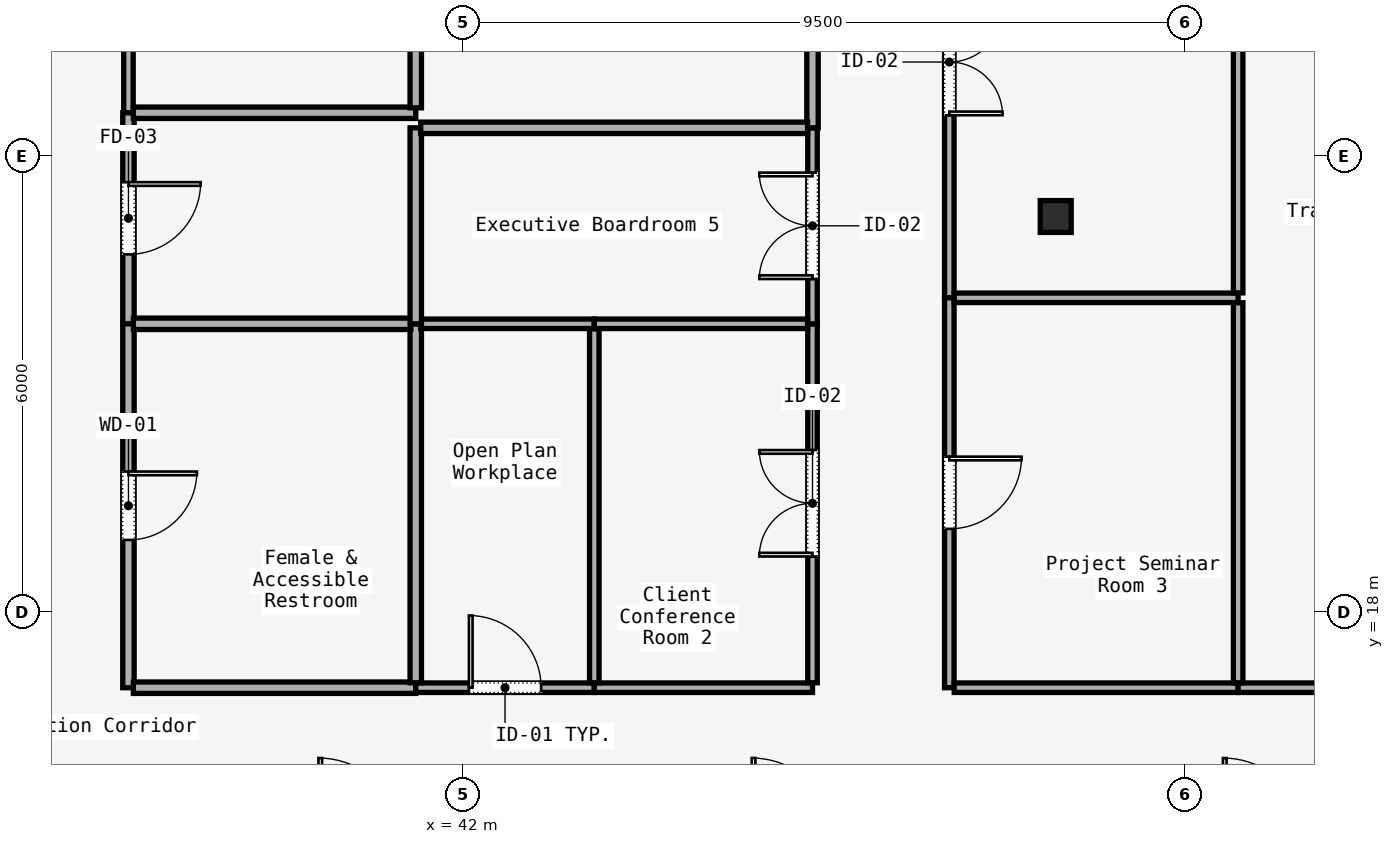
"""IFC4 building model, lengths in metres.
Left out: names, types, materials, properties, quantities, classifications, styles, units other than length and angle.
Written with IfcOpenShell. Run it as: python <this file> out.ifc"""

import sys

from ifc_helpers import new_model, si_unit, direction, frame, frame_2d, origin, origin_2d, place, context, subcontext, project, spatial, rectangle, i_section, extrude, element, fill, save


model = new_model("IFC4")
c1 = context("Model", 3, precision=1e-05, world=origin(), true_north=direction((0.0, 1.0)))
c2 = subcontext(c1, "Body", "Model", "MODEL_VIEW")
j1 = project(units=[si_unit("LENGTHUNIT", "METRE"), si_unit("PLANEANGLEUNIT", "RADIAN")], contexts=[c1])
p1 = place(None, origin())
s1 = spatial("IfcSite", under=j1, at=p1, CompositionType="ELEMENT")
p2 = place(p1, origin())
s2 = spatial("IfcBuilding", under=s1, at=p2, CompositionType="ELEMENT")
p3 = place(p2, frame((0.0, 0.0, 134.6)))
s3 = spatial("IfcBuildingStorey", under=s2, at=p3, CompositionType="ELEMENT", Elevation=134.6)
p4 = place(p3, frame((49.8, 23.2, 0.0), z_axis=(0.0, 0.0, 1.0), x_axis=(1.0, 0.0, 0.0)))
e1 = element("IfcColumn", 1, at=p4, inside=s3, PredefinedType="COLUMN", context=c2, shape_type="SweptSolid", body=[
    extrude(i_section(OverallWidth=0.407, OverallDepth=0.419, WebThickness=0.031, FlangeThickness=0.049, FilletRadius=0.015, at=origin_2d()), origin(), (0.0, 0.0, 1.0), 3.58),
])
p5 = place(p3, frame((37.6, 28.335, 0.0), z_axis=(0.0, 0.0, 1.0), x_axis=(0.0, -1.0, 0.0)))
e2 = element("IfcWall", 2, at=p5, inside=s3, PredefinedType="PARTITIONING", context=c2, shape_type="SweptSolid", body=[
    extrude(rectangle(XDim=3.77, YDim=0.125, at=frame_2d((1.885, 0.0))), origin(), (0.0, 0.0, 1.0), 3.01),
])
p6 = place(p5, frame((1.41, 0.0, 0.0)))
e3 = element("IfcOpeningElement", 3, at=p6, cuts=e2, PredefinedType="OPENING", context=c2, shape_type="SweptSolid", body=[
    extrude(rectangle(XDim=0.95, YDim=2.2, at=frame_2d((0.475, 1.1))), frame((0.0, 0.062, 0.0), z_axis=(0.0, -1.0, 0.0), x_axis=(1.0, 0.0, 0.0)), (0.0, 0.0, 1.0), 0.125),
])
p7 = place(p3, frame((37.6, 24.565, 0.0), z_axis=(0.0, 0.0, 1.0), x_axis=(0.0, -1.0, 0.0)))
e4 = element("IfcWall", 4, at=p7, inside=s3, PredefinedType="PARTITIONING", context=c2, shape_type="SweptSolid", body=[
    extrude(rectangle(XDim=2.777, YDim=0.15, at=frame_2d((1.388, 0.0))), origin(), (0.0, 0.0, 1.0), 3.01),
])
p8 = place(p7, frame((0.914, 0.0, 0.0)))
e5 = element("IfcOpeningElement", 5, at=p8, cuts=e4, PredefinedType="OPENING", context=c2, shape_type="SweptSolid", body=[
    extrude(rectangle(XDim=0.95, YDim=2.2, at=frame_2d((0.475, 1.1))), frame((0.0, 0.075, 0.0), z_axis=(0.0, -1.0, 0.0), x_axis=(1.0, 0.0, 0.0)), (0.0, 0.0, 1.0), 0.15),
])
p9 = place(p3, frame((37.6, 21.788, 0.0), z_axis=(0.0, 0.0, 1.0), x_axis=(0.0, -1.0, 0.0)))
e6 = element("IfcWall", 6, at=p9, inside=s3, PredefinedType="PARTITIONING", context=c2, shape_type="SweptSolid", body=[
    extrude(rectangle(XDim=4.788, YDim=0.15, at=frame_2d((2.394, 0.0))), origin(), (0.0, 0.0, 1.0), 3.01),
])
p10 = place(p9, frame((1.944, 0.0, 0.0)))
e7 = element("IfcOpeningElement", 7, at=p10, cuts=e6, PredefinedType="OPENING", context=c2, shape_type="SweptSolid", body=[
    extrude(rectangle(XDim=0.9, YDim=2.15, at=frame_2d((0.45, 1.075))), frame((0.0, 0.075, 0.0), z_axis=(0.0, -1.0, 0.0), x_axis=(1.0, 0.0, 0.0)), (0.0, 0.0, 1.0), 0.15),
])
p11 = place(p3, frame((37.665, 17.0, 0.0), z_axis=(0.0, 0.0, 1.0), x_axis=(1.0, 0.0, 0.0)))
e8 = element("IfcWall", 8, at=p11, inside=s3, PredefinedType="PARTITIONING", context=c2, shape_type="SweptSolid", body=[
    extrude(rectangle(XDim=3.715, YDim=0.15, at=frame_2d((1.857, 0.0))), origin(), (0.0, 0.0, 1.0), 3.01),
])
p12 = place(p3, frame((41.38, 17.0, 0.0), z_axis=(0.0, 0.0, 1.0), x_axis=(1.0, 0.0, 0.0)))
e9 = element("IfcWall", 9, at=p12, inside=s3, PredefinedType="PARTITIONING", context=c2, shape_type="SweptSolid", body=[
    extrude(rectangle(XDim=2.349, YDim=0.125, at=frame_2d((1.175, 0.0))), origin(), (0.0, 0.0, 1.0), 3.01),
])
p13 = place(p12, frame((0.699, 0.0, 0.0)))
e10 = element("IfcOpeningElement", 10, at=p13, cuts=e9, PredefinedType="OPENING", context=c2, shape_type="SweptSolid", body=[
    extrude(rectangle(XDim=0.95, YDim=2.2, at=frame_2d((0.475, 1.1))), frame((0.0, 0.062, 0.0), z_axis=(0.0, -1.0, 0.0), x_axis=(1.0, 0.0, 0.0)), (0.0, 0.0, 1.0), 0.125),
])
p14 = place(p3, frame((43.729, 17.0, 0.0), z_axis=(0.0, 0.0, 1.0), x_axis=(1.0, 0.0, 0.0)))
e11 = element("IfcWall", 11, at=p14, inside=s3, PredefinedType="PARTITIONING", context=c2, shape_type="SweptSolid", body=[
    extrude(rectangle(XDim=2.871, YDim=0.125, at=frame_2d((1.436, 0.0))), origin(), (0.0, 0.0, 1.0), 3.01),
])
p15 = place(p3, frame((46.6, 17.065, 0.0), z_axis=(0.0, 0.0, 1.0), x_axis=(0.0, 1.0, 0.0)))
e12 = element("IfcWall", 12, at=p15, inside=s3, PredefinedType="PARTITIONING", context=c2, shape_type="SweptSolid", body=[
    extrude(rectangle(XDim=4.723, YDim=0.125, at=frame_2d((2.362, 0.0))), origin(), (0.0, 0.0, 1.0), 3.01),
])
p16 = place(p15, frame((1.662, 0.0, 0.0)))
e13 = element("IfcOpeningElement", 13, at=p16, cuts=e12, PredefinedType="OPENING", context=c2, shape_type="SweptSolid", body=[
    extrude(rectangle(XDim=1.4, YDim=2.2, at=frame_2d((0.7, 1.1))), frame((0.0, 0.062, 0.0), z_axis=(0.0, -1.0, 0.0), x_axis=(1.0, 0.0, 0.0)), (0.0, 0.0, 1.0), 0.125),
])
p17 = place(p3, frame((46.6, 21.788, 0.0), z_axis=(0.0, 0.0, 1.0), x_axis=(0.0, 1.0, 0.0)))
e14 = element("IfcWall", 14, at=p17, inside=s3, PredefinedType="PARTITIONING", context=c2, shape_type="SweptSolid", body=[
    extrude(rectangle(XDim=2.579, YDim=0.125, at=frame_2d((1.289, 0.0))), origin(), (0.0, 0.0, 1.0), 3.01),
])
p18 = place(p17, frame((0.589, 0.0, 0.0)))
e15 = element("IfcOpeningElement", 15, at=p18, cuts=e14, PredefinedType="OPENING", context=c2, shape_type="SweptSolid", body=[
    extrude(rectangle(XDim=1.4, YDim=2.2, at=frame_2d((0.7, 1.1))), frame((0.0, 0.062, 0.0), z_axis=(0.0, -1.0, 0.0), x_axis=(1.0, 0.0, 0.0)), (0.0, 0.0, 1.0), 0.125),
])
p19 = place(p3, frame((46.6, 24.367, 0.0), z_axis=(0.0, 0.0, 1.0), x_axis=(0.0, 1.0, 0.0)))
e16 = element("IfcWall", 16, at=p19, inside=s3, PredefinedType="PARTITIONING", context=c2, shape_type="SweptSolid", body=[
    extrude(rectangle(XDim=4.033, YDim=0.15, at=frame_2d((2.017, 0.0))), origin(), (0.0, 0.0, 1.0), 3.01),
])
p20 = place(p19, frame((1.542, 0.0, 0.0)))
e17 = element("IfcOpeningElement", 17, at=p20, cuts=e16, PredefinedType="OPENING", context=c2, shape_type="SweptSolid", body=[
    extrude(rectangle(XDim=0.95, YDim=2.2, at=frame_2d((0.475, 1.1))), frame((0.0, 0.075, 0.0), z_axis=(0.0, -1.0, 0.0), x_axis=(1.0, 0.0, 0.0)), (0.0, 0.0, 1.0), 0.15),
])
p21 = place(p3, frame((48.4, 28.335, 0.0), z_axis=(0.0, 0.0, 1.0), x_axis=(0.0, -1.0, 0.0)))
e18 = element("IfcWall", 18, at=p21, inside=s3, PredefinedType="PARTITIONING", context=c2, shape_type="SweptSolid", body=[
    extrude(rectangle(XDim=6.205, YDim=0.125, at=frame_2d((3.103, 0.0))), origin(), (0.0, 0.0, 1.0), 3.01),
])
p22 = place(p21, frame((2.403, 0.0, 0.0)))
e19 = element("IfcOpeningElement", 19, at=p22, cuts=e18, PredefinedType="OPENING", context=c2, shape_type="SweptSolid", body=[
    extrude(rectangle(XDim=1.4, YDim=2.2, at=frame_2d((0.7, 1.1))), frame((0.0, 0.062, 0.0), z_axis=(0.0, -1.0, 0.0), x_axis=(1.0, 0.0, 0.0)), (0.0, 0.0, 1.0), 0.125),
])
p23 = place(p3, frame((48.4, 22.13, 0.0), z_axis=(0.0, 0.0, 1.0), x_axis=(0.0, -1.0, 0.0)))
e20 = element("IfcWall", 20, at=p23, inside=s3, PredefinedType="PARTITIONING", context=c2, shape_type="SweptSolid", body=[
    extrude(rectangle(XDim=5.13, YDim=0.125, at=frame_2d((2.565, 0.0))), origin(), (0.0, 0.0, 1.0), 3.01),
])
p24 = place(p23, frame((2.09, 0.0, 0.0)))
e21 = element("IfcOpeningElement", 21, at=p24, cuts=e20, PredefinedType="OPENING", context=c2, shape_type="SweptSolid", body=[
    extrude(rectangle(XDim=0.95, YDim=2.2, at=frame_2d((0.475, 1.1))), frame((0.0, 0.062, 0.0), z_axis=(0.0, -1.0, 0.0), x_axis=(1.0, 0.0, 0.0)), (0.0, 0.0, 1.0), 0.125),
])
p25 = place(p3, frame((48.465, 17.0, 0.0), z_axis=(0.0, 0.0, 1.0), x_axis=(1.0, 0.0, 0.0)))
e22 = element("IfcWall", 22, at=p25, inside=s3, PredefinedType="PARTITIONING", context=c2, shape_type="SweptSolid", body=[
    extrude(rectangle(XDim=3.735, YDim=0.125, at=frame_2d((1.867, 0.0))), origin(), (0.0, 0.0, 1.0), 3.01),
])
p26 = place(p3, frame((52.2, 17.0, 0.0), z_axis=(0.0, 0.0, 1.0), x_axis=(1.0, 0.0, 0.0)))
e23 = element("IfcWall", 23, at=p26, inside=s3, PredefinedType="PARTITIONING", context=c2, shape_type="SweptSolid", body=[
    extrude(rectangle(XDim=4.333, YDim=0.125, at=frame_2d((2.166, 0.0))), origin(), (0.0, 0.0, 1.0), 3.01),
])
p27 = place(p26, frame((1.691, 0.0, 0.0)))
e24 = element("IfcOpeningElement", 24, at=p27, cuts=e23, PredefinedType="OPENING", context=c2, shape_type="SweptSolid", body=[
    extrude(rectangle(XDim=0.95, YDim=2.2, at=frame_2d((0.475, 1.1))), frame((0.0, 0.062, 0.0), z_axis=(0.0, -1.0, 0.0), x_axis=(1.0, 0.0, 0.0)), (0.0, 0.0, 1.0), 0.125),
])
p28 = place(p3, frame((41.38, 21.788, 0.0), z_axis=(0.0, 0.0, 1.0), x_axis=(0.0, -1.0, 0.0)))
e25 = element("IfcWall", 25, at=p28, inside=s3, PredefinedType="PARTITIONING", context=c2, shape_type="SweptSolid", body=[
    extrude(rectangle(XDim=4.723, YDim=0.15, at=frame_2d((2.362, 0.0))), origin(), (0.0, 0.0, 1.0), 3.01),
])
p29 = place(p3, frame((37.665, 21.788, 0.0), z_axis=(0.0, 0.0, 1.0), x_axis=(1.0, 0.0, 0.0)))
e26 = element("IfcWall", 26, at=p29, inside=s3, PredefinedType="PARTITIONING", context=c2, shape_type="SweptSolid", body=[
    extrude(rectangle(XDim=3.65, YDim=0.15, at=frame_2d((1.825, 0.0))), origin(), (0.0, 0.0, 1.0), 3.01),
])
p30 = place(p3, frame((41.445, 21.788, 0.0), z_axis=(0.0, 0.0, 1.0), x_axis=(1.0, 0.0, 0.0)))
e27 = element("IfcWall", 27, at=p30, inside=s3, PredefinedType="PARTITIONING", context=c2, shape_type="SweptSolid", body=[
    extrude(rectangle(XDim=2.284, YDim=0.125, at=frame_2d((1.142, 0.0))), origin(), (0.0, 0.0, 1.0), 3.01),
])
p31 = place(p3, frame((43.729, 21.723, 0.0), z_axis=(0.0, 0.0, 1.0), x_axis=(0.0, -1.0, 0.0)))
e28 = element("IfcWall", 28, at=p31, inside=s3, PredefinedType="PARTITIONING", context=c2, shape_type="SweptSolid", body=[
    extrude(rectangle(XDim=4.658, YDim=0.125, at=frame_2d((2.329, 0.0))), origin(), (0.0, 0.0, 1.0), 3.01),
])
p32 = place(p3, frame((43.729, 21.788, 0.0), z_axis=(0.0, 0.0, 1.0), x_axis=(1.0, 0.0, 0.0)))
e29 = element("IfcWall", 29, at=p32, inside=s3, PredefinedType="PARTITIONING", context=c2, shape_type="SweptSolid", body=[
    extrude(rectangle(XDim=2.806, YDim=0.125, at=frame_2d((1.403, 0.0))), origin(), (0.0, 0.0, 1.0), 3.01),
])
p33 = place(p3, frame((48.465, 22.13, 0.0), z_axis=(0.0, 0.0, 1.0), x_axis=(1.0, 0.0, 0.0)))
e30 = element("IfcWall", 30, at=p33, inside=s3, PredefinedType="PARTITIONING", context=c2, shape_type="SweptSolid", body=[
    extrude(rectangle(XDim=3.735, YDim=0.125, at=frame_2d((1.867, 0.0))), origin(), (0.0, 0.0, 1.0), 3.01),
])
p34 = place(p3, frame((52.2, 22.065, 0.0), z_axis=(0.0, 0.0, 1.0), x_axis=(0.0, -1.0, 0.0)))
e31 = element("IfcWall", 31, at=p34, inside=s3, PredefinedType="PARTITIONING", context=c2, shape_type="SweptSolid", body=[
    extrude(rectangle(XDim=5.0, YDim=0.125, at=frame_2d((2.5, 0.0))), origin(), (0.0, 0.0, 1.0), 3.01),
])
p35 = place(p3, frame((52.2, 22.195, 0.0), z_axis=(0.0, 0.0, 1.0), x_axis=(0.0, 1.0, 0.0)))
e32 = element("IfcWall", 32, at=p35, inside=s3, PredefinedType="PARTITIONING", context=c2, shape_type="SweptSolid", body=[
    extrude(rectangle(XDim=6.205, YDim=0.125, at=frame_2d((3.103, 0.0))), origin(), (0.0, 0.0, 1.0), 3.01),
])
p36 = place(p3, frame((41.38, 21.788, 0.0), z_axis=(0.0, 0.0, 1.0), x_axis=(0.0, 1.0, 0.0)))
e33 = element("IfcWall", 33, at=p36, inside=s3, PredefinedType="PARTITIONING", context=c2, shape_type="SweptSolid", body=[
    extrude(rectangle(XDim=2.579, YDim=0.15, at=frame_2d((1.289, 0.0))), origin(), (0.0, 0.0, 1.0), 3.01),
])
p37 = place(p3, frame((41.445, 24.367, 0.0), z_axis=(0.0, 0.0, 1.0), x_axis=(1.0, 0.0, 0.0)))
e34 = element("IfcWall", 34, at=p37, inside=s3, PredefinedType="PARTITIONING", context=c2, shape_type="SweptSolid", body=[
    extrude(rectangle(XDim=5.09, YDim=0.15, at=frame_2d((2.545, 0.0))), origin(), (0.0, 0.0, 1.0), 3.01),
])
p38 = place(p3, frame((37.665, 24.565, 0.0), z_axis=(0.0, 0.0, 1.0), x_axis=(1.0, 0.0, 0.0)))
e35 = element("IfcWall", 35, at=p38, inside=s3, PredefinedType="PARTITIONING", context=c2, shape_type="SweptSolid", body=[
    extrude(rectangle(XDim=3.715, YDim=0.15, at=frame_2d((1.857, 0.0))), origin(), (0.0, 0.0, 1.0), 3.01),
])
p39 = place(p3, frame((41.38, 24.63, 0.0), z_axis=(0.0, 0.0, 1.0), x_axis=(0.0, 1.0, 0.0)))
e36 = element("IfcWall", 36, at=p39, inside=s3, PredefinedType="PARTITIONING", context=c2, shape_type="SweptSolid", body=[
    extrude(rectangle(XDim=3.77, YDim=0.15, at=frame_2d((1.885, 0.0))), origin(), (0.0, 0.0, 1.0), 3.01),
])
p40 = place(p10, origin())
e37 = element("IfcDoor", 37, at=p40, inside=s3, OperationType="SINGLE_SWING_RIGHT", PredefinedType="DOOR", context=c2, shape_type="SweptSolid", body=[
    extrude(rectangle(XDim=0.9, YDim=2.15, at=frame_2d((0.45, 1.075))), frame((0.0, 0.025, 0.0), z_axis=(0.0, -1.0, 0.0), x_axis=(1.0, 0.0, 0.0)), (0.0, 0.0, 1.0), 0.05),
])
fill(e7, e37)
p41 = place(p13, origin())
e38 = element("IfcDoor", 38, at=p41, inside=s3, OperationType="SINGLE_SWING_LEFT", PredefinedType="DOOR", context=c2, shape_type="SweptSolid", body=[
    extrude(rectangle(XDim=0.95, YDim=2.2, at=frame_2d((0.475, 1.1))), frame((0.0, 0.025, 0.0), z_axis=(0.0, -1.0, 0.0), x_axis=(1.0, 0.0, 0.0)), (0.0, 0.0, 1.0), 0.05),
])
fill(e10, e38)
p42 = place(p16, origin())
e39 = element("IfcDoor", 39, at=p42, inside=s3, OperationType="SINGLE_SWING_RIGHT", PredefinedType="DOOR", context=c2, shape_type="SweptSolid", body=[
    extrude(rectangle(XDim=1.4, YDim=2.2, at=frame_2d((0.7, 1.1))), frame((0.0, 0.025, 0.0), z_axis=(0.0, -1.0, 0.0), x_axis=(1.0, 0.0, 0.0)), (0.0, 0.0, 1.0), 0.05),
])
fill(e13, e39)
p43 = place(p24, origin())
e40 = element("IfcDoor", 40, at=p43, inside=s3, OperationType="SINGLE_SWING_LEFT", PredefinedType="DOOR", context=c2, shape_type="SweptSolid", body=[
    extrude(rectangle(XDim=0.95, YDim=2.2, at=frame_2d((0.475, 1.1))), frame((0.0, 0.025, 0.0), z_axis=(0.0, -1.0, 0.0), x_axis=(1.0, 0.0, 0.0)), (0.0, 0.0, 1.0), 0.05),
])
fill(e21, e40)
p44 = place(p18, origin())
e41 = element("IfcDoor", 41, at=p44, inside=s3, OperationType="SINGLE_SWING_RIGHT", PredefinedType="DOOR", context=c2, shape_type="SweptSolid", body=[
    extrude(rectangle(XDim=1.4, YDim=2.2, at=frame_2d((0.7, 1.1))), frame((0.0, 0.025, 0.0), z_axis=(0.0, -1.0, 0.0), x_axis=(1.0, 0.0, 0.0)), (0.0, 0.0, 1.0), 0.05),
])
fill(e15, e41)
p45 = place(p8, origin())
e42 = element("IfcDoor", 42, at=p45, inside=s3, OperationType="SINGLE_SWING_LEFT", PredefinedType="DOOR", context=c2, shape_type="SweptSolid", body=[
    extrude(rectangle(XDim=0.95, YDim=2.2, at=frame_2d((0.475, 1.1))), frame((0.0, 0.025, 0.0), z_axis=(0.0, -1.0, 0.0), x_axis=(1.0, 0.0, 0.0)), (0.0, 0.0, 1.0), 0.05),
])
fill(e5, e42)
p46 = place(p22, origin())
e43 = element("IfcDoor", 43, at=p46, inside=s3, OperationType="SINGLE_SWING_RIGHT", PredefinedType="DOOR", context=c2, shape_type="SweptSolid", body=[
    extrude(rectangle(XDim=1.4, YDim=2.2, at=frame_2d((0.7, 1.1))), frame((0.0, 0.025, 0.0), z_axis=(0.0, -1.0, 0.0), x_axis=(1.0, 0.0, 0.0)), (0.0, 0.0, 1.0), 0.05),
])
fill(e19, e43)
save(model, sys.argv[1])
